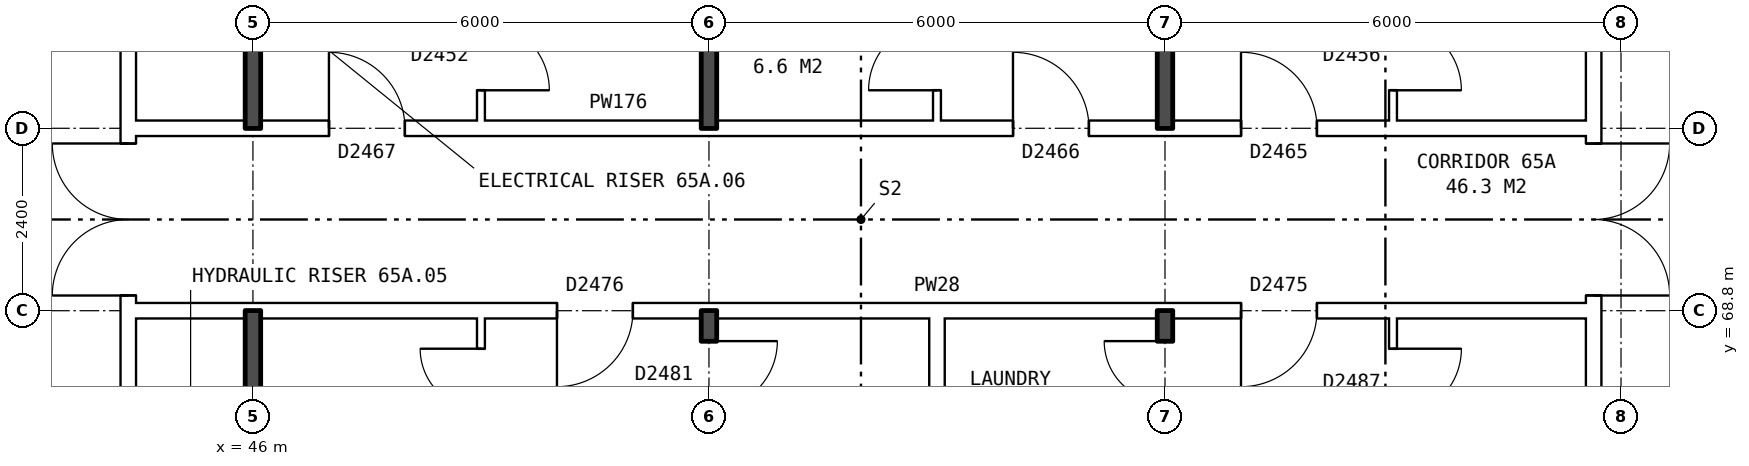
"""IFC4 building model, lengths in metres.
Left out: names, types, materials, properties, quantities, classifications, styles, units other than length and angle.
Written with IfcOpenShell. Run it as: python <this file> out.ifc"""

import sys

from ifc_helpers import new_model, si_unit, direction, frame, frame_2d, origin, place, context, subcontext, project, spatial, rectangle, extrude, element, fill, save


model = new_model("IFC4")
c1 = context("Model", 3, precision=1e-05, world=origin(), true_north=direction((0.0, 1.0)))
c2 = subcontext(c1, "Body", "Model", "MODEL_VIEW")
j1 = project(units=[si_unit("LENGTHUNIT", "METRE"), si_unit("PLANEANGLEUNIT", "RADIAN")], contexts=[c1])
p1 = place(None, origin())
s1 = spatial("IfcSite", under=j1, at=p1, CompositionType="ELEMENT")
p2 = place(p1, origin())
s2 = spatial("IfcBuilding", under=s1, at=p2, CompositionType="ELEMENT")
p3 = place(p2, frame((0.0, 0.0, 230.7)))
s3 = spatial("IfcBuildingStorey", under=s2, at=p3, CompositionType="ELEMENT", Elevation=230.7)
p4 = place(p3, frame((63.64, 63.9, 0.0), z_axis=(0.0, 0.0, 1.0), x_axis=(0.0, 1.0, 0.0)))
e1 = element("IfcWall", 1, at=p4, inside=s3, PredefinedType="PARTITIONING", context=c2, shape_type="SweptSolid", body=[
    extrude(rectangle(XDim=12.2, YDim=0.2, at=frame_2d((6.1, 0.0))), origin(), (0.0, 0.0, 1.0), 2.85),
])
p5 = place(p4, frame((5.1, 0.0, 0.0)))
e2 = element("IfcOpeningElement", 2, at=p5, cuts=e1, PredefinedType="OPENING", context=c2, shape_type="SweptSolid", body=[
    extrude(rectangle(XDim=2.0, YDim=2.1, at=frame_2d((1.0, 1.05))), frame((0.0, 0.11, 0.0), z_axis=(0.0, -1.0, 0.0), x_axis=(1.0, 0.0, 0.0)), (0.0, 0.0, 1.0), 0.22),
])
p6 = place(p3, frame((44.36, 63.9, 0.0), z_axis=(0.0, 0.0, 1.0), x_axis=(0.0, 1.0, 0.0)))
e3 = element("IfcWall", 3, at=p6, inside=s3, PredefinedType="PARTITIONING", context=c2, shape_type="SweptSolid", body=[
    extrude(rectangle(XDim=12.2, YDim=0.2, at=frame_2d((6.1, 0.0))), origin(), (0.0, 0.0, 1.0), 2.85),
])
p7 = place(p6, frame((5.1, 0.0, 0.0)))
e4 = element("IfcOpeningElement", 4, at=p7, cuts=e3, PredefinedType="OPENING", context=c2, shape_type="SweptSolid", body=[
    extrude(rectangle(XDim=2.0, YDim=2.1, at=frame_2d((1.0, 1.05))), frame((0.0, 0.11, 0.0), z_axis=(0.0, -1.0, 0.0), x_axis=(1.0, 0.0, 0.0)), (0.0, 0.0, 1.0), 0.22),
])
p8 = place(p3, frame((44.36, 68.8, 0.0), z_axis=(0.0, 0.0, 1.0), x_axis=(1.0, 0.0, 0.0)))
e5 = element("IfcWall", 5, at=p8, inside=s3, PredefinedType="PARTITIONING", context=c2, shape_type="SweptSolid", body=[
    extrude(rectangle(XDim=19.28, YDim=0.2, at=frame_2d((9.64, 0.0))), origin(), (0.0, 0.0, 1.0), 2.85),
])
p9 = place(p8, frame((14.64, 0.0, 0.0)))
e6 = element("IfcOpeningElement", 6, at=p9, cuts=e5, PredefinedType="OPENING", context=c2, shape_type="SweptSolid", body=[
    extrude(rectangle(XDim=1.0, YDim=2.1, at=frame_2d((0.5, 1.05))), frame((0.0, 0.11, 0.0), z_axis=(0.0, -1.0, 0.0), x_axis=(1.0, 0.0, 0.0)), (0.0, 0.0, 1.0), 0.22),
])
p10 = place(p8, frame((5.64, 0.0, 0.0)))
e7 = element("IfcOpeningElement", 7, at=p10, cuts=e5, PredefinedType="OPENING", context=c2, shape_type="SweptSolid", body=[
    extrude(rectangle(XDim=1.0, YDim=2.1, at=frame_2d((0.5, 1.05))), frame((0.0, 0.11, 0.0), z_axis=(0.0, -1.0, 0.0), x_axis=(1.0, 0.0, 0.0)), (0.0, 0.0, 1.0), 0.22),
])
p11 = place(p3, frame((44.36, 71.2, 0.0), z_axis=(0.0, 0.0, 1.0), x_axis=(1.0, 0.0, 0.0)))
e8 = element("IfcWall", 8, at=p11, inside=s3, PredefinedType="PARTITIONING", context=c2, shape_type="SweptSolid", body=[
    extrude(rectangle(XDim=19.28, YDim=0.2, at=frame_2d((9.64, 0.0))), origin(), (0.0, 0.0, 1.0), 2.85),
])
p12 = place(p11, frame((14.64, 0.0, 0.0)))
e9 = element("IfcOpeningElement", 9, at=p12, cuts=e8, PredefinedType="OPENING", context=c2, shape_type="SweptSolid", body=[
    extrude(rectangle(XDim=1.0, YDim=2.1, at=frame_2d((0.5, 1.05))), frame((0.0, 0.11, 0.0), z_axis=(0.0, -1.0, 0.0), x_axis=(1.0, 0.0, 0.0)), (0.0, 0.0, 1.0), 0.22),
])
p13 = place(p11, frame((11.64, 0.0, 0.0)))
e10 = element("IfcOpeningElement", 10, at=p13, cuts=e8, PredefinedType="OPENING", context=c2, shape_type="SweptSolid", body=[
    extrude(rectangle(XDim=1.0, YDim=2.1, at=frame_2d((0.5, 1.05))), frame((0.0, 0.11, 0.0), z_axis=(0.0, -1.0, 0.0), x_axis=(1.0, 0.0, 0.0)), (0.0, 0.0, 1.0), 0.22),
])
p14 = place(p11, frame((2.64, 0.0, 0.0)))
e11 = element("IfcOpeningElement", 11, at=p14, cuts=e8, PredefinedType="OPENING", context=c2, shape_type="SweptSolid", body=[
    extrude(rectangle(XDim=1.0, YDim=2.1, at=frame_2d((0.5, 1.05))), frame((0.0, 0.11, 0.0), z_axis=(0.0, -1.0, 0.0), x_axis=(1.0, 0.0, 0.0)), (0.0, 0.0, 1.0), 0.22),
])
for number, where, z_axis, x_axis in (
    (12, (46.0, 54.36, 0.0), (0.0, 0.0, 1.0), (0.0, 1.0, 0.0)),
    (13, (46.0, 71.2, 0.0), (0.0, 0.0, 1.0), (0.0, 1.0, 0.0)),
):
    element("IfcWall", number, at=place(p3, frame(where, z_axis=z_axis, x_axis=x_axis)), inside=s3, PredefinedType="SOLIDWALL", context=c2, shape_type="SweptSolid", body=[
        extrude(rectangle(XDim=14.44, YDim=0.2, at=frame_2d((7.22, 0.0))), origin(), (0.0, 0.0, 1.0), 2.85),
    ])
p15 = place(p3, frame((49.0, 54.36, 0.0), z_axis=(0.0, 0.0, 1.0), x_axis=(0.0, 1.0, 0.0)))
e14 = element("IfcWall", 14, at=p15, inside=s3, PredefinedType="PARTITIONING", context=c2, shape_type="SweptSolid", body=[
    extrude(rectangle(XDim=14.34, YDim=0.1, at=frame_2d((7.17, 0.0))), origin(), (0.0, 0.0, 1.0), 2.85),
])
p16 = place(p15, frame((4.2, 0.0, 0.0)))
e15 = element("IfcOpeningElement", 15, at=p16, cuts=e14, PredefinedType="OPENING", context=c2, shape_type="SweptSolid", body=[
    extrude(rectangle(XDim=0.9, YDim=2.1, at=frame_2d((0.45, 1.05))), frame((0.0, 0.06, 0.0), z_axis=(0.0, -1.0, 0.0), x_axis=(1.0, 0.0, 0.0)), (0.0, 0.0, 1.0), 0.12),
])
p17 = place(p15, frame((13.14, 0.0, 0.0)))
e16 = element("IfcOpeningElement", 16, at=p17, cuts=e14, PredefinedType="OPENING", context=c2, shape_type="SweptSolid", body=[
    extrude(rectangle(XDim=0.8, YDim=2.1, at=frame_2d((0.4, 1.05))), frame((0.0, 0.06, 0.0), z_axis=(0.0, -1.0, 0.0), x_axis=(1.0, 0.0, 0.0)), (0.0, 0.0, 1.0), 0.12),
])
p18 = place(p3, frame((49.0, 71.3, 0.0), z_axis=(0.0, 0.0, 1.0), x_axis=(0.0, 1.0, 0.0)))
e17 = element("IfcWall", 17, at=p18, inside=s3, PredefinedType="PARTITIONING", context=c2, shape_type="SweptSolid", body=[
    extrude(rectangle(XDim=14.34, YDim=0.1, at=frame_2d((7.17, 0.0))), origin(), (0.0, 0.0, 1.0), 2.85),
])
p19 = place(p18, frame((6.74, 0.0, 0.0)))
e18 = element("IfcOpeningElement", 18, at=p19, cuts=e17, PredefinedType="OPENING", context=c2, shape_type="SweptSolid", body=[
    extrude(rectangle(XDim=0.9, YDim=2.1, at=frame_2d((0.45, 1.05))), frame((0.0, 0.06, 0.0), z_axis=(0.0, -1.0, 0.0), x_axis=(1.0, 0.0, 0.0)), (0.0, 0.0, 1.0), 0.12),
])
p20 = place(p18, frame((0.4, 0.0, 0.0)))
e19 = element("IfcOpeningElement", 19, at=p20, cuts=e17, PredefinedType="OPENING", context=c2, shape_type="SweptSolid", body=[
    extrude(rectangle(XDim=0.9, YDim=2.1, at=frame_2d((0.45, 1.05))), frame((0.0, 0.06, 0.0), z_axis=(0.0, -1.0, 0.0), x_axis=(1.0, 0.0, 0.0)), (0.0, 0.0, 1.0), 0.12),
])
p21 = place(p3, frame((52.0, 54.36, 0.0), z_axis=(0.0, 0.0, 1.0), x_axis=(0.0, 1.0, 0.0)))
e20 = element("IfcWall", 20, at=p21, inside=s3, PredefinedType="SOLIDWALL", context=c2, shape_type="SweptSolid", body=[
    extrude(rectangle(XDim=14.44, YDim=0.2, at=frame_2d((7.22, 0.0))), origin(), (0.0, 0.0, 1.0), 2.85),
])
p22 = place(p21, frame((4.2, 0.0, 0.0)))
e21 = element("IfcOpeningElement", 21, at=p22, cuts=e20, PredefinedType="OPENING", context=c2, shape_type="SweptSolid", body=[
    extrude(rectangle(XDim=0.9, YDim=2.1, at=frame_2d((0.45, 1.05))), frame((0.0, 0.11, 0.0), z_axis=(0.0, -1.0, 0.0), x_axis=(1.0, 0.0, 0.0)), (0.0, 0.0, 1.0), 0.22),
])
p23 = place(p21, frame((13.14, 0.0, 0.0)))
e22 = element("IfcOpeningElement", 22, at=p23, cuts=e20, PredefinedType="OPENING", context=c2, shape_type="SweptSolid", body=[
    extrude(rectangle(XDim=0.9, YDim=2.1, at=frame_2d((0.45, 1.05))), frame((0.0, 0.11, 0.0), z_axis=(0.0, -1.0, 0.0), x_axis=(1.0, 0.0, 0.0)), (0.0, 0.0, 1.0), 0.22),
])
p24 = place(p3, frame((52.0, 71.2, 0.0), z_axis=(0.0, 0.0, 1.0), x_axis=(0.0, 1.0, 0.0)))
e23 = element("IfcWall", 23, at=p24, inside=s3, PredefinedType="SOLIDWALL", context=c2, shape_type="SweptSolid", body=[
    extrude(rectangle(XDim=14.44, YDim=0.2, at=frame_2d((7.22, 0.0))), origin(), (0.0, 0.0, 1.0), 2.85),
])
p25 = place(p3, frame((55.0, 54.36, 0.0), z_axis=(0.0, 0.0, 1.0), x_axis=(0.0, 1.0, 0.0)))
e24 = element("IfcWall", 24, at=p25, inside=s3, PredefinedType="PARTITIONING", context=c2, shape_type="SweptSolid", body=[
    extrude(rectangle(XDim=14.34, YDim=0.2, at=frame_2d((7.17, 0.0))), origin(), (0.0, 0.0, 1.0), 2.85),
])
p26 = place(p3, frame((55.0, 71.3, 0.0), z_axis=(0.0, 0.0, 1.0), x_axis=(0.0, 1.0, 0.0)))
e25 = element("IfcWall", 25, at=p26, inside=s3, PredefinedType="PARTITIONING", context=c2, shape_type="SweptSolid", body=[
    extrude(rectangle(XDim=14.34, YDim=0.1, at=frame_2d((7.17, 0.0))), origin(), (0.0, 0.0, 1.0), 2.85),
])
p27 = place(p26, frame((9.24, 0.0, 0.0)))
e26 = element("IfcOpeningElement", 26, at=p27, cuts=e25, PredefinedType="OPENING", context=c2, shape_type="SweptSolid", body=[
    extrude(rectangle(XDim=0.9, YDim=2.1, at=frame_2d((0.45, 1.05))), frame((0.0, 0.06, 0.0), z_axis=(0.0, -1.0, 0.0), x_axis=(1.0, 0.0, 0.0)), (0.0, 0.0, 1.0), 0.12),
])
p28 = place(p26, frame((0.4, 0.0, 0.0)))
e27 = element("IfcOpeningElement", 27, at=p28, cuts=e25, PredefinedType="OPENING", context=c2, shape_type="SweptSolid", body=[
    extrude(rectangle(XDim=0.9, YDim=2.1, at=frame_2d((0.45, 1.05))), frame((0.0, 0.06, 0.0), z_axis=(0.0, -1.0, 0.0), x_axis=(1.0, 0.0, 0.0)), (0.0, 0.0, 1.0), 0.12),
])
p29 = place(p3, frame((58.0, 54.36, 0.0), z_axis=(0.0, 0.0, 1.0), x_axis=(0.0, 1.0, 0.0)))
e28 = element("IfcWall", 28, at=p29, inside=s3, PredefinedType="SOLIDWALL", context=c2, shape_type="SweptSolid", body=[
    extrude(rectangle(XDim=14.44, YDim=0.2, at=frame_2d((7.22, 0.0))), origin(), (0.0, 0.0, 1.0), 2.85),
])
p30 = place(p29, frame((5.5, 0.0, 0.0)))
e29 = element("IfcOpeningElement", 29, at=p30, cuts=e28, PredefinedType="OPENING", context=c2, shape_type="SweptSolid", body=[
    extrude(rectangle(XDim=0.9, YDim=2.1, at=frame_2d((0.45, 1.05))), frame((0.0, 0.11, 0.0), z_axis=(0.0, -1.0, 0.0), x_axis=(1.0, 0.0, 0.0)), (0.0, 0.0, 1.0), 0.22),
])
p31 = place(p29, frame((13.24, 0.0, 0.0)))
e30 = element("IfcOpeningElement", 30, at=p31, cuts=e28, PredefinedType="OPENING", context=c2, shape_type="SweptSolid", body=[
    extrude(rectangle(XDim=0.8, YDim=2.1, at=frame_2d((0.4, 1.05))), frame((0.0, 0.11, 0.0), z_axis=(0.0, -1.0, 0.0), x_axis=(1.0, 0.0, 0.0)), (0.0, 0.0, 1.0), 0.22),
])
p32 = place(p3, frame((58.0, 71.2, 0.0), z_axis=(0.0, 0.0, 1.0), x_axis=(0.0, 1.0, 0.0)))
e31 = element("IfcWall", 31, at=p32, inside=s3, PredefinedType="SOLIDWALL", context=c2, shape_type="SweptSolid", body=[
    extrude(rectangle(XDim=14.44, YDim=0.2, at=frame_2d((7.22, 0.0))), origin(), (0.0, 0.0, 1.0), 2.85),
])
p33 = place(p3, frame((61.0, 54.36, 0.0), z_axis=(0.0, 0.0, 1.0), x_axis=(0.0, 1.0, 0.0)))
e32 = element("IfcWall", 32, at=p33, inside=s3, PredefinedType="PARTITIONING", context=c2, shape_type="SweptSolid", body=[
    extrude(rectangle(XDim=14.34, YDim=0.1, at=frame_2d((7.17, 0.0))), origin(), (0.0, 0.0, 1.0), 2.85),
])
p34 = place(p33, frame((5.5, 0.0, 0.0)))
e33 = element("IfcOpeningElement", 33, at=p34, cuts=e32, PredefinedType="OPENING", context=c2, shape_type="SweptSolid", body=[
    extrude(rectangle(XDim=0.9, YDim=2.1, at=frame_2d((0.45, 1.05))), frame((0.0, 0.06, 0.0), z_axis=(0.0, -1.0, 0.0), x_axis=(1.0, 0.0, 0.0)), (0.0, 0.0, 1.0), 0.12),
])
p35 = place(p33, frame((13.04, 0.0, 0.0)))
e34 = element("IfcOpeningElement", 34, at=p35, cuts=e32, PredefinedType="OPENING", context=c2, shape_type="SweptSolid", body=[
    extrude(rectangle(XDim=0.9, YDim=2.1, at=frame_2d((0.45, 1.05))), frame((0.0, 0.06, 0.0), z_axis=(0.0, -1.0, 0.0), x_axis=(1.0, 0.0, 0.0)), (0.0, 0.0, 1.0), 0.12),
])
p36 = place(p3, frame((61.0, 71.3, 0.0), z_axis=(0.0, 0.0, 1.0), x_axis=(0.0, 1.0, 0.0)))
e35 = element("IfcWall", 35, at=p36, inside=s3, PredefinedType="PARTITIONING", context=c2, shape_type="SweptSolid", body=[
    extrude(rectangle(XDim=14.34, YDim=0.1, at=frame_2d((7.17, 0.0))), origin(), (0.0, 0.0, 1.0), 2.85),
])
p37 = place(p36, frame((5.74, 0.0, 0.0)))
e36 = element("IfcOpeningElement", 36, at=p37, cuts=e35, PredefinedType="OPENING", context=c2, shape_type="SweptSolid", body=[
    extrude(rectangle(XDim=0.9, YDim=2.1, at=frame_2d((0.45, 1.05))), frame((0.0, 0.06, 0.0), z_axis=(0.0, -1.0, 0.0), x_axis=(1.0, 0.0, 0.0)), (0.0, 0.0, 1.0), 0.12),
])
p38 = place(p36, frame((0.4, 0.0, 0.0)))
e37 = element("IfcOpeningElement", 37, at=p38, cuts=e35, PredefinedType="OPENING", context=c2, shape_type="SweptSolid", body=[
    extrude(rectangle(XDim=0.9, YDim=2.1, at=frame_2d((0.45, 1.05))), frame((0.0, 0.06, 0.0), z_axis=(0.0, -1.0, 0.0), x_axis=(1.0, 0.0, 0.0)), (0.0, 0.0, 1.0), 0.12),
])
p39 = place(p5, frame((2.0, 0.0, 0.0), z_axis=(0.0, 0.0, 1.0), x_axis=(-1.0, 0.0, 0.0)))
e38 = element("IfcDoor", 38, at=p39, inside=s3, OperationType="DOUBLE_DOOR_SINGLE_SWING", PredefinedType="DOOR", context=c2, shape_type="SweptSolid", body=[
    extrude(rectangle(XDim=2.0, YDim=2.1, at=frame_2d((1.0, 1.05))), frame((0.0, 0.025, 0.0), z_axis=(0.0, -1.0, 0.0), x_axis=(1.0, 0.0, 0.0)), (0.0, 0.0, 1.0), 0.05),
])
fill(e2, e38)
p40 = place(p7, origin())
e39 = element("IfcDoor", 39, at=p40, inside=s3, OperationType="DOUBLE_DOOR_SINGLE_SWING", PredefinedType="DOOR", context=c2, shape_type="SweptSolid", body=[
    extrude(rectangle(XDim=2.0, YDim=2.1, at=frame_2d((1.0, 1.05))), frame((0.0, 0.025, 0.0), z_axis=(0.0, -1.0, 0.0), x_axis=(1.0, 0.0, 0.0)), (0.0, 0.0, 1.0), 0.05),
])
fill(e4, e39)
p41 = place(p9, frame((1.0, 0.0, 0.0), z_axis=(0.0, 0.0, 1.0), x_axis=(-1.0, 0.0, 0.0)))
e40 = element("IfcDoor", 40, at=p41, inside=s3, OperationType="SINGLE_SWING_RIGHT", PredefinedType="DOOR", context=c2, shape_type="SweptSolid", body=[
    extrude(rectangle(XDim=1.0, YDim=2.1, at=frame_2d((0.5, 1.05))), frame((0.0, 0.025, 0.0), z_axis=(0.0, -1.0, 0.0), x_axis=(1.0, 0.0, 0.0)), (0.0, 0.0, 1.0), 0.05),
])
fill(e6, e40)
p42 = place(p35, frame((0.9, 0.0, 0.0), z_axis=(0.0, 0.0, 1.0), x_axis=(-1.0, 0.0, 0.0)))
e41 = element("IfcDoor", 41, at=p42, inside=s3, OperationType="SINGLE_SWING_LEFT", PredefinedType="DOOR", context=c2, shape_type="SweptSolid", body=[
    extrude(rectangle(XDim=0.9, YDim=2.1, at=frame_2d((0.45, 1.05))), frame((0.0, 0.025, 0.0), z_axis=(0.0, -1.0, 0.0), x_axis=(1.0, 0.0, 0.0)), (0.0, 0.0, 1.0), 0.05),
])
fill(e34, e41)
p43 = place(p31, origin())
e42 = element("IfcDoor", 42, at=p43, inside=s3, OperationType="SINGLE_SWING_RIGHT", PredefinedType="DOOR", context=c2, shape_type="SweptSolid", body=[
    extrude(rectangle(XDim=0.8, YDim=2.1, at=frame_2d((0.4, 1.05))), frame((0.0, 0.025, 0.0), z_axis=(0.0, -1.0, 0.0), x_axis=(1.0, 0.0, 0.0)), (0.0, 0.0, 1.0), 0.05),
])
fill(e30, e42)
p44 = place(p10, frame((1.0, 0.0, 0.0), z_axis=(0.0, 0.0, 1.0), x_axis=(-1.0, 0.0, 0.0)))
e43 = element("IfcDoor", 43, at=p44, inside=s3, OperationType="SINGLE_SWING_RIGHT", PredefinedType="DOOR", context=c2, shape_type="SweptSolid", body=[
    extrude(rectangle(XDim=1.0, YDim=2.1, at=frame_2d((0.5, 1.05))), frame((0.0, 0.025, 0.0), z_axis=(0.0, -1.0, 0.0), x_axis=(1.0, 0.0, 0.0)), (0.0, 0.0, 1.0), 0.05),
])
fill(e7, e43)
p45 = place(p23, frame((0.9, 0.0, 0.0), z_axis=(0.0, 0.0, 1.0), x_axis=(-1.0, 0.0, 0.0)))
e44 = element("IfcDoor", 44, at=p45, inside=s3, OperationType="SINGLE_SWING_LEFT", PredefinedType="DOOR", context=c2, shape_type="SweptSolid", body=[
    extrude(rectangle(XDim=0.9, YDim=2.1, at=frame_2d((0.45, 1.05))), frame((0.0, 0.025, 0.0), z_axis=(0.0, -1.0, 0.0), x_axis=(1.0, 0.0, 0.0)), (0.0, 0.0, 1.0), 0.05),
])
fill(e22, e44)
p46 = place(p17, origin())
e45 = element("IfcDoor", 45, at=p46, inside=s3, OperationType="SINGLE_SWING_RIGHT", PredefinedType="DOOR", context=c2, shape_type="SweptSolid", body=[
    extrude(rectangle(XDim=0.8, YDim=2.1, at=frame_2d((0.4, 1.05))), frame((0.0, 0.025, 0.0), z_axis=(0.0, -1.0, 0.0), x_axis=(1.0, 0.0, 0.0)), (0.0, 0.0, 1.0), 0.05),
])
fill(e16, e45)
p47 = place(p12, origin())
e46 = element("IfcDoor", 46, at=p47, inside=s3, OperationType="SINGLE_SWING_LEFT", PredefinedType="DOOR", context=c2, shape_type="SweptSolid", body=[
    extrude(rectangle(XDim=1.0, YDim=2.1, at=frame_2d((0.5, 1.05))), frame((0.0, 0.025, 0.0), z_axis=(0.0, -1.0, 0.0), x_axis=(1.0, 0.0, 0.0)), (0.0, 0.0, 1.0), 0.05),
])
fill(e9, e46)
p48 = place(p38, frame((0.9, 0.0, 0.0), z_axis=(0.0, 0.0, 1.0), x_axis=(-1.0, 0.0, 0.0)))
e47 = element("IfcDoor", 47, at=p48, inside=s3, OperationType="SINGLE_SWING_RIGHT", PredefinedType="DOOR", context=c2, shape_type="SweptSolid", body=[
    extrude(rectangle(XDim=0.9, YDim=2.1, at=frame_2d((0.45, 1.05))), frame((0.0, 0.025, 0.0), z_axis=(0.0, -1.0, 0.0), x_axis=(1.0, 0.0, 0.0)), (0.0, 0.0, 1.0), 0.05),
])
fill(e37, e47)
p49 = place(p13, origin())
e48 = element("IfcDoor", 48, at=p49, inside=s3, OperationType="SINGLE_SWING_LEFT", PredefinedType="DOOR", context=c2, shape_type="SweptSolid", body=[
    extrude(rectangle(XDim=1.0, YDim=2.1, at=frame_2d((0.5, 1.05))), frame((0.0, 0.025, 0.0), z_axis=(0.0, -1.0, 0.0), x_axis=(1.0, 0.0, 0.0)), (0.0, 0.0, 1.0), 0.05),
])
fill(e10, e48)
p50 = place(p28, origin())
e49 = element("IfcDoor", 49, at=p50, inside=s3, OperationType="SINGLE_SWING_LEFT", PredefinedType="DOOR", context=c2, shape_type="SweptSolid", body=[
    extrude(rectangle(XDim=0.9, YDim=2.1, at=frame_2d((0.45, 1.05))), frame((0.0, 0.025, 0.0), z_axis=(0.0, -1.0, 0.0), x_axis=(1.0, 0.0, 0.0)), (0.0, 0.0, 1.0), 0.05),
])
fill(e27, e49)
p51 = place(p14, origin())
e50 = element("IfcDoor", 50, at=p51, inside=s3, OperationType="SINGLE_SWING_LEFT", PredefinedType="DOOR", context=c2, shape_type="SweptSolid", body=[
    extrude(rectangle(XDim=1.0, YDim=2.1, at=frame_2d((0.5, 1.05))), frame((0.0, 0.025, 0.0), z_axis=(0.0, -1.0, 0.0), x_axis=(1.0, 0.0, 0.0)), (0.0, 0.0, 1.0), 0.05),
])
fill(e11, e50)
p52 = place(p20, frame((0.9, 0.0, 0.0), z_axis=(0.0, 0.0, 1.0), x_axis=(-1.0, 0.0, 0.0)))
e51 = element("IfcDoor", 51, at=p52, inside=s3, OperationType="SINGLE_SWING_RIGHT", PredefinedType="DOOR", context=c2, shape_type="SweptSolid", body=[
    extrude(rectangle(XDim=0.9, YDim=2.1, at=frame_2d((0.45, 1.05))), frame((0.0, 0.025, 0.0), z_axis=(0.0, -1.0, 0.0), x_axis=(1.0, 0.0, 0.0)), (0.0, 0.0, 1.0), 0.05),
])
fill(e19, e51)
save(model, sys.argv[1])
